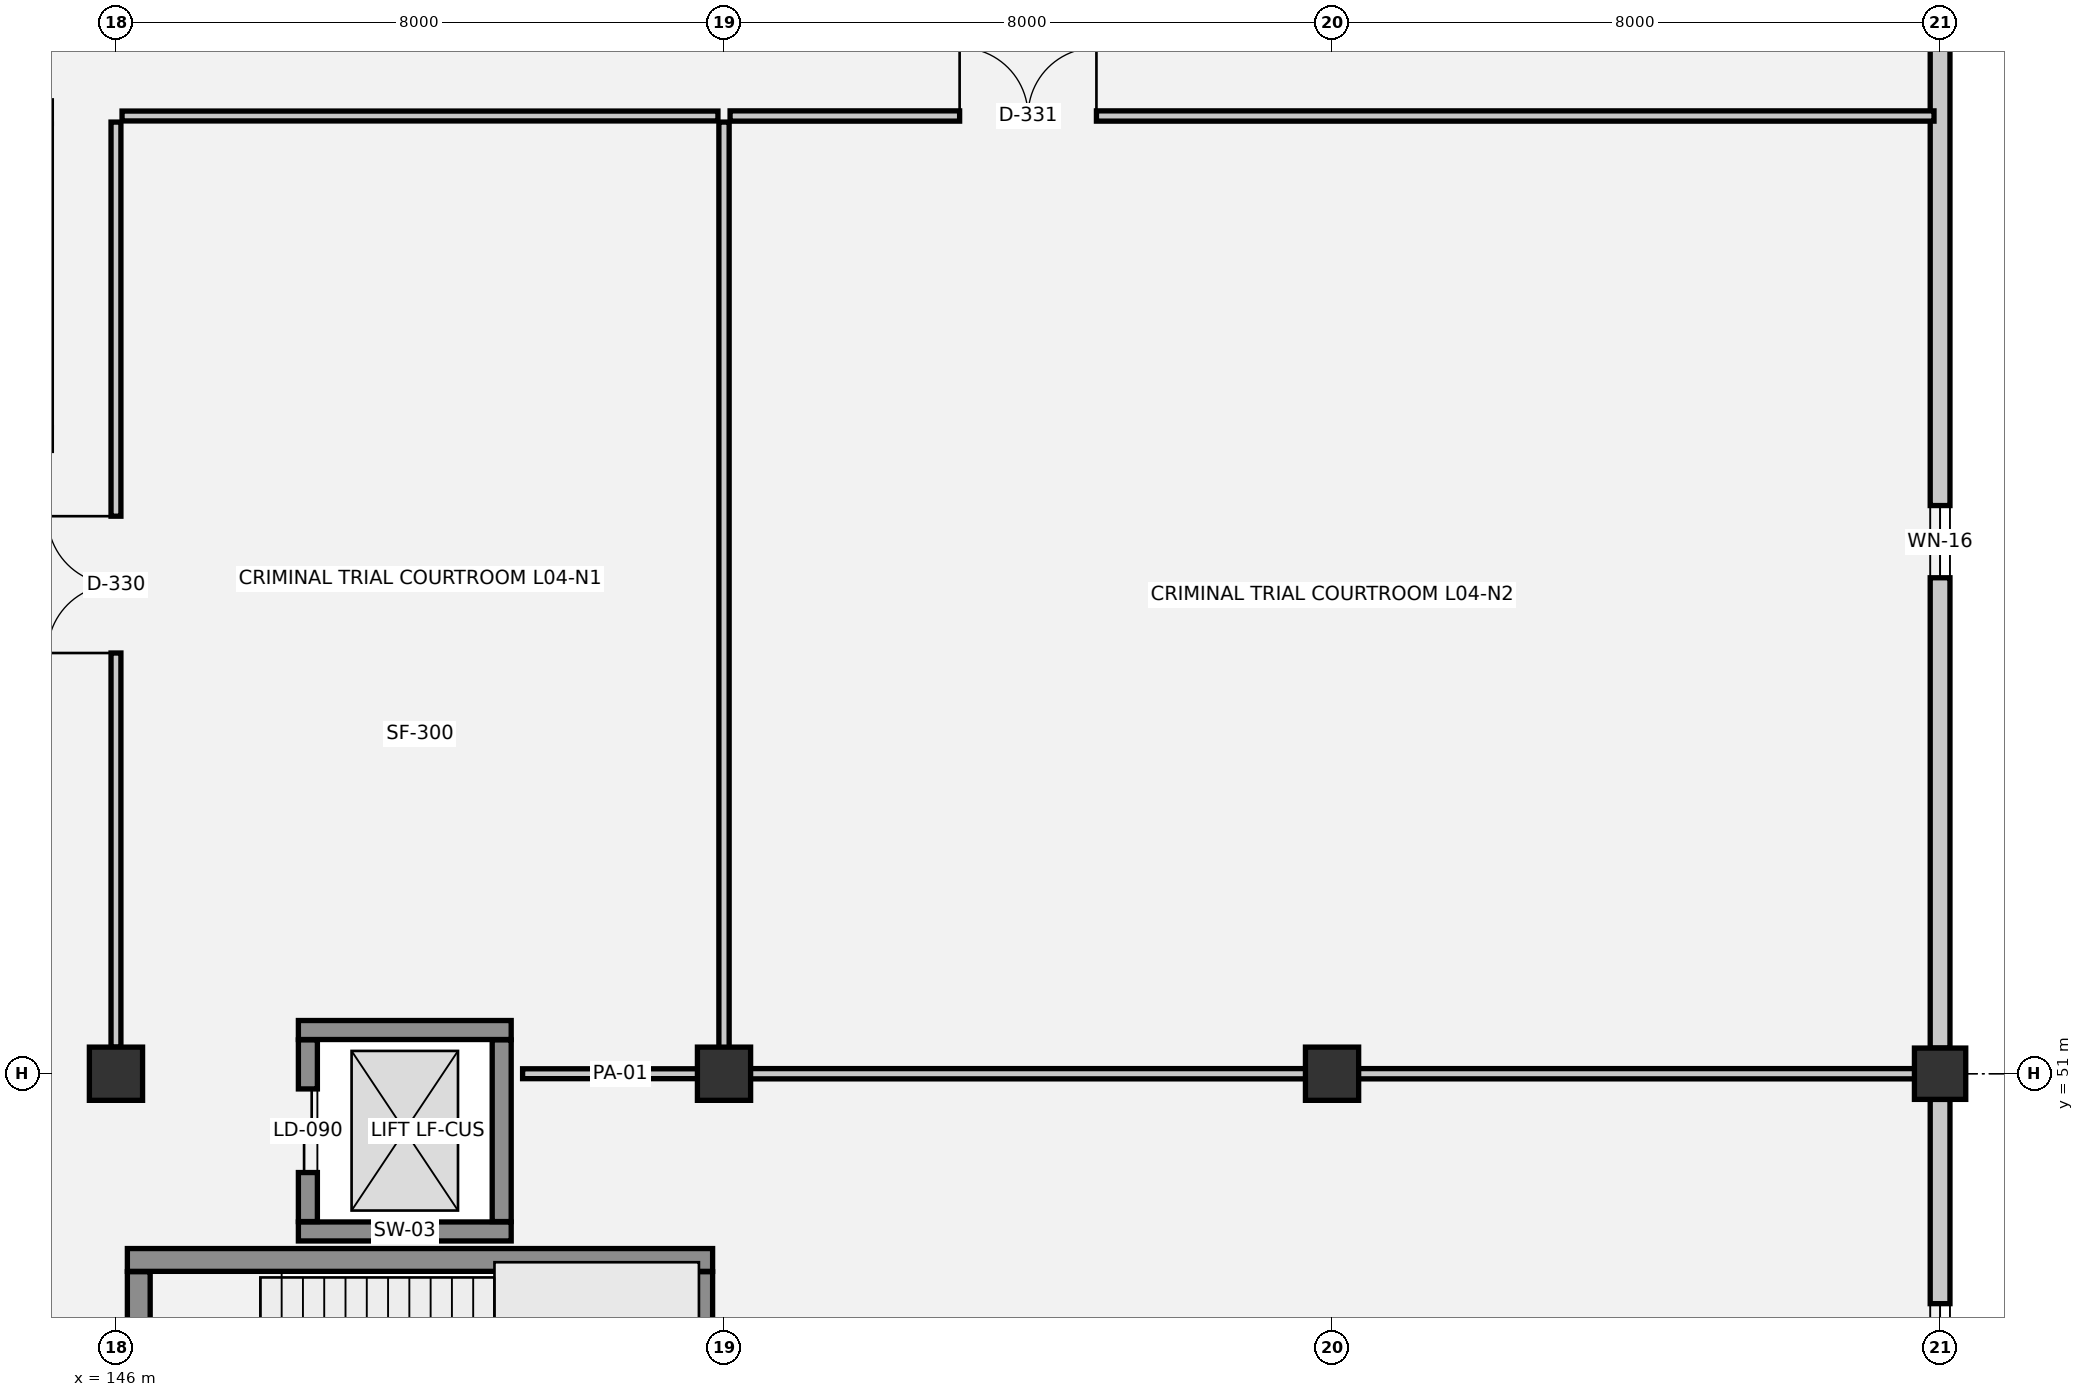
"""IFC4 building model, lengths in metres.
Left out: names, types, materials, properties, quantities, classifications, styles, units other than length and angle.
Written with IfcOpenShell. Run it as: python <this file> out.ifc"""

import sys

from ifc_helpers import new_model, si_unit, direction, frame, frame_2d, origin, origin_2d, place, context, subcontext, project, spatial, rectangle, extrude, element, fill, save


model = new_model("IFC4")
c1 = context("Model", 3, precision=1e-05, world=origin(), true_north=direction((0.0, 1.0)))
c2 = subcontext(c1, "Body", "Model", "MODEL_VIEW")
j1 = project(units=[si_unit("LENGTHUNIT", "METRE"), si_unit("PLANEANGLEUNIT", "RADIAN")], contexts=[c1])
p1 = place(None, origin())
s1 = spatial("IfcSite", under=j1, at=p1, CompositionType="ELEMENT")
p2 = place(p1, origin())
s2 = spatial("IfcBuilding", under=s1, at=p2, CompositionType="ELEMENT")
p3 = place(p2, frame((0.0, 0.0, 14.4)))
s3 = spatial("IfcBuildingStorey", under=s2, at=p3, CompositionType="ELEMENT", Elevation=14.4)
for number, where, z_axis, x_axis in (
    (1, (146.0, 51.0, 0.0), (0.0, 0.0, 1.0), (1.0, 0.0, 0.0)),
    (2, (154.0, 51.0, 0.0), (0.0, 0.0, 1.0), (1.0, 0.0, 0.0)),
    (3, (162.0, 51.0, 0.0), (0.0, 0.0, 1.0), (1.0, 0.0, 0.0)),
):
    element("IfcColumn", number, at=place(p3, frame(where, z_axis=z_axis, x_axis=x_axis)), inside=s3, PredefinedType="COLUMN", context=c2, shape_type="SweptSolid", body=[
        extrude(rectangle(XDim=0.7, YDim=0.7, at=origin_2d()), origin(), (0.0, 0.0, 1.0), 3.9),
    ])
p4 = place(p3, frame((170.0, 51.0, 0.0), z_axis=(0.0, 0.0, 1.0), x_axis=(1.0, 0.0, 0.0)))
e4 = element("IfcColumn", 4, at=p4, inside=s3, PredefinedType="COLUMN", context=c2, shape_type="SweptSolid", body=[
    extrude(rectangle(XDim=0.675, YDim=0.675, at=origin_2d()), origin(), (0.0, 0.0, 1.0), 3.9),
])
p5 = place(p3, frame((170.0, 64.663, 0.0), z_axis=(0.0, 0.0, 1.0), x_axis=(0.0, -1.0, 0.0)))
e5 = element("IfcWall", 5, at=p5, inside=s3, PredefinedType="SOLIDWALL", context=c2, shape_type="SweptSolid", body=[
    extrude(rectangle(XDim=13.325, YDim=0.26, at=frame_2d((6.663, 0.0))), origin(), (0.0, 0.0, 1.0), 2.61),
])
p6 = place(p5, frame((6.188, 0.0, 1.0)))
e6 = element("IfcOpeningElement", 6, at=p6, cuts=e5, PredefinedType="OPENING", context=c2, shape_type="SweptSolid", body=[
    extrude(rectangle(XDim=0.95, YDim=1.1, at=frame_2d((0.475, 0.55))), frame((0.0, 0.14, 0.0), z_axis=(0.0, -1.0, 0.0), x_axis=(1.0, 0.0, 0.0)), (0.0, 0.0, 1.0), 0.28),
])
p7 = place(p3, frame((170.0, 50.663, 0.0), z_axis=(0.0, 0.0, 1.0), x_axis=(0.0, -1.0, 0.0)))
e7 = element("IfcWall", 7, at=p7, inside=s3, PredefinedType="SOLIDWALL", context=c2, shape_type="SweptSolid", body=[
    extrude(rectangle(XDim=6.325, YDim=0.26, at=frame_2d((3.163, 0.0))), origin(), (0.0, 0.0, 1.0), 2.61),
])
p8 = place(p7, frame((2.688, 0.0, 1.0)))
e8 = element("IfcOpeningElement", 8, at=p8, cuts=e7, PredefinedType="OPENING", context=c2, shape_type="SweptSolid", body=[
    extrude(rectangle(XDim=0.95, YDim=1.1, at=frame_2d((0.475, 0.55))), frame((0.0, 0.14, 0.0), z_axis=(0.0, -1.0, 0.0), x_axis=(1.0, 0.0, 0.0)), (0.0, 0.0, 1.0), 0.28),
])
for number, where, z_axis, x_axis in (
    (9, (148.4, 48.925, 0.0), (0.0, 0.0, 1.0), (1.0, 0.0, 0.0)),
    (10, (151.2, 51.575, 0.0), (0.0, 0.0, 1.0), (-1.0, 0.0, 0.0)),
):
    element("IfcWall", number, at=place(p3, frame(where, z_axis=z_axis, x_axis=x_axis)), inside=s3, PredefinedType="SHEAR", context=c2, shape_type="SweptSolid", body=[
        extrude(rectangle(XDim=2.8, YDim=0.25, at=frame_2d((1.4, 0.0))), origin(), (0.0, 0.0, 1.0), 3.9),
    ])
p9 = place(p3, frame((148.525, 51.445, 0.0), z_axis=(0.0, 0.0, 1.0), x_axis=(0.0, -1.0, 0.0)))
e11 = element("IfcWall", 11, at=p9, inside=s3, PredefinedType="SHEAR", context=c2, shape_type="SweptSolid", body=[
    extrude(rectangle(XDim=2.39, YDim=0.25, at=frame_2d((1.195, 0.0))), origin(), (0.0, 0.0, 1.0), 3.9),
])
p10 = place(p9, frame((0.645, 0.0, 0.0)))
e12 = element("IfcOpeningElement", 12, at=p10, cuts=e11, PredefinedType="OPENING", context=c2, shape_type="SweptSolid", body=[
    extrude(rectangle(XDim=1.1, YDim=2.15, at=frame_2d((0.55, 1.075))), frame((0.0, 0.135, 0.0), z_axis=(0.0, -1.0, 0.0), x_axis=(1.0, 0.0, 0.0)), (0.0, 0.0, 1.0), 0.27),
])
p11 = place(p3, frame((151.075, 49.055, 0.0), z_axis=(0.0, 0.0, 1.0), x_axis=(0.0, 1.0, 0.0)))
e13 = element("IfcWall", 13, at=p11, inside=s3, PredefinedType="SHEAR", context=c2, shape_type="SweptSolid", body=[
    extrude(rectangle(XDim=2.39, YDim=0.25, at=frame_2d((1.195, 0.0))), origin(), (0.0, 0.0, 1.0), 3.9),
])
p12 = place(p3, frame((153.85, 48.55, 0.0), z_axis=(0.0, 0.0, 1.0), x_axis=(-1.0, 0.0, 0.0)))
e14 = element("IfcWall", 14, at=p12, inside=s3, PredefinedType="SHEAR", context=c2, shape_type="SweptSolid", body=[
    extrude(rectangle(XDim=7.7, YDim=0.3, at=frame_2d((3.85, 0.0))), origin(), (0.0, 0.0, 1.0), 3.62),
])
p13 = place(p3, frame((146.3, 48.395, 0.0), z_axis=(0.0, 0.0, 1.0), x_axis=(0.0, -1.0, 0.0)))
e15 = element("IfcWall", 15, at=p13, inside=s3, PredefinedType="SHEAR", context=c2, shape_type="SweptSolid", body=[
    extrude(rectangle(XDim=3.99, YDim=0.3, at=frame_2d((1.995, 0.0))), origin(), (0.0, 0.0, 1.0), 3.62),
])
p14 = place(p13, frame((1.37, 0.0, 0.0)))
e16 = element("IfcOpeningElement", 16, at=p14, cuts=e15, PredefinedType="OPENING", context=c2, shape_type="SweptSolid", body=[
    extrude(rectangle(XDim=1.25, YDim=2.15, at=frame_2d((0.625, 1.075))), frame((0.0, 0.16, 0.0), z_axis=(0.0, -1.0, 0.0), x_axis=(1.0, 0.0, 0.0)), (0.0, 0.0, 1.0), 0.32),
])
p15 = place(p3, frame((153.7, 44.405, 0.0), z_axis=(0.0, 0.0, 1.0), x_axis=(0.0, 1.0, 0.0)))
e17 = element("IfcWall", 17, at=p15, inside=s3, PredefinedType="SHEAR", context=c2, shape_type="SweptSolid", body=[
    extrude(rectangle(XDim=3.99, YDim=0.3, at=frame_2d((1.995, 0.0))), origin(), (0.0, 0.0, 1.0), 3.62),
])
p16 = place(p3, frame((151.35, 51.0, 0.0), z_axis=(0.0, 0.0, 1.0), x_axis=(1.0, 0.0, 0.0)))
e18 = element("IfcWall", 18, at=p16, inside=s3, PredefinedType="PARTITIONING", context=c2, shape_type="SweptSolid", body=[
    extrude(rectangle(XDim=2.57, YDim=0.13, at=frame_2d((1.285, 0.0))), origin(), (0.0, 0.0, 1.0), 2.93),
])
p17 = place(p3, frame((154.08, 51.0, 0.0), z_axis=(0.0, 0.0, 1.0), x_axis=(1.0, 0.0, 0.0)))
e19 = element("IfcWall", 19, at=p17, inside=s3, PredefinedType="PARTITIONING", context=c2, shape_type="SweptSolid", body=[
    extrude(rectangle(XDim=15.84, YDim=0.135, at=frame_2d((7.92, 0.0))), origin(), (0.0, 0.0, 1.0), 2.93),
])
p18 = place(p3, frame((146.08, 63.6, 0.0), z_axis=(0.0, 0.0, 1.0), x_axis=(1.0, 0.0, 0.0)))
e20 = element("IfcWall", 20, at=p18, inside=s3, PredefinedType="PARTITIONING", context=c2, shape_type="SweptSolid", body=[
    extrude(rectangle(XDim=7.84, YDim=0.13, at=frame_2d((3.92, 0.0))), origin(), (0.0, 0.0, 1.0), 3.54),
])
p19 = place(p3, frame((154.08, 63.6, 0.0), z_axis=(0.0, 0.0, 1.0), x_axis=(1.0, 0.0, 0.0)))
e21 = element("IfcWall", 21, at=p19, inside=s3, PredefinedType="PARTITIONING", context=c2, shape_type="SweptSolid", body=[
    extrude(rectangle(XDim=15.84, YDim=0.135, at=frame_2d((7.92, 0.0))), origin(), (0.0, 0.0, 1.0), 3.54),
])
p20 = place(p19, frame((3.02, 0.0, 0.0)))
e22 = element("IfcOpeningElement", 22, at=p20, cuts=e21, PredefinedType="OPENING", context=c2, shape_type="SweptSolid", body=[
    extrude(rectangle(XDim=1.8, YDim=2.3, at=frame_2d((0.9, 1.15))), frame((0.0, 0.077, 0.0), z_axis=(0.0, -1.0, 0.0), x_axis=(1.0, 0.0, 0.0)), (0.0, 0.0, 1.0), 0.155),
])
p21 = place(p3, frame((146.0, 51.35, 0.0), z_axis=(0.0, 0.0, 1.0), x_axis=(0.0, 1.0, 0.0)))
e23 = element("IfcWall", 23, at=p21, inside=s3, PredefinedType="PARTITIONING", context=c2, shape_type="SweptSolid", body=[
    extrude(rectangle(XDim=12.17, YDim=0.13, at=frame_2d((6.085, 0.0))), origin(), (0.0, 0.0, 1.0), 2.63),
])
p22 = place(p21, frame((5.185, 0.0, 0.0)))
e24 = element("IfcOpeningElement", 24, at=p22, cuts=e23, PredefinedType="OPENING", context=c2, shape_type="SweptSolid", body=[
    extrude(rectangle(XDim=1.8, YDim=2.3, at=frame_2d((0.9, 1.15))), frame((0.0, 0.075, 0.0), z_axis=(0.0, -1.0, 0.0), x_axis=(1.0, 0.0, 0.0)), (0.0, 0.0, 1.0), 0.15),
])
p23 = place(p3, frame((154.0, 51.08, 0.0), z_axis=(0.0, 0.0, 1.0), x_axis=(0.0, 1.0, 0.0)))
e25 = element("IfcWall", 25, at=p23, inside=s3, PredefinedType="PARTITIONING", context=c2, shape_type="SweptSolid", body=[
    extrude(rectangle(XDim=12.44, YDim=0.135, at=frame_2d((6.22, 0.0))), origin(), (0.0, 0.0, 1.0), 2.63),
])
p24 = place(p6, origin())
e26 = element("IfcWindow", 26, at=p24, inside=s3, PartitioningType="SINGLE_PANEL", PredefinedType="WINDOW", context=c2, shape_type="SweptSolid", body=[
    extrude(rectangle(XDim=0.95, YDim=1.1, at=frame_2d((0.475, 0.55))), frame((0.0, 0.03, 0.0), z_axis=(0.0, -1.0, 0.0), x_axis=(1.0, 0.0, 0.0)), (0.0, 0.0, 1.0), 0.06),
])
fill(e6, e26)
p25 = place(p8, origin())
e27 = element("IfcWindow", 27, at=p25, inside=s3, PartitioningType="SINGLE_PANEL", PredefinedType="WINDOW", context=c2, shape_type="SweptSolid", body=[
    extrude(rectangle(XDim=0.95, YDim=1.1, at=frame_2d((0.475, 0.55))), frame((0.0, 0.03, 0.0), z_axis=(0.0, -1.0, 0.0), x_axis=(1.0, 0.0, 0.0)), (0.0, 0.0, 1.0), 0.06),
])
fill(e8, e27)
p26 = place(p10, origin())
e28 = element("IfcDoor", 28, at=p26, inside=s3, OperationType="DOUBLE_DOOR_SLIDING", PredefinedType="DOOR", context=c2, shape_type="SweptSolid", body=[
    extrude(rectangle(XDim=1.1, YDim=2.15, at=frame_2d((0.55, 1.075))), frame((0.0, 0.025, 0.0), z_axis=(0.0, -1.0, 0.0), x_axis=(1.0, 0.0, 0.0)), (0.0, 0.0, 1.0), 0.05),
])
fill(e12, e28)
p27 = place(p22, origin())
e29 = element("IfcDoor", 29, at=p27, inside=s3, OperationType="DOUBLE_DOOR_SINGLE_SWING", PredefinedType="DOOR", context=c2, shape_type="SweptSolid", body=[
    extrude(rectangle(XDim=1.8, YDim=2.3, at=frame_2d((0.9, 1.15))), frame((0.0, 0.025, 0.0), z_axis=(0.0, -1.0, 0.0), x_axis=(1.0, 0.0, 0.0)), (0.0, 0.0, 1.0), 0.05),
])
fill(e24, e29)
p28 = place(p20, origin())
e30 = element("IfcDoor", 30, at=p28, inside=s3, OperationType="DOUBLE_DOOR_SINGLE_SWING", PredefinedType="DOOR", context=c2, shape_type="SweptSolid", body=[
    extrude(rectangle(XDim=1.8, YDim=2.3, at=frame_2d((0.9, 1.15))), frame((0.0, 0.025, 0.0), z_axis=(0.0, -1.0, 0.0), x_axis=(1.0, 0.0, 0.0)), (0.0, 0.0, 1.0), 0.05),
])
fill(e22, e30)
save(model, sys.argv[1])
